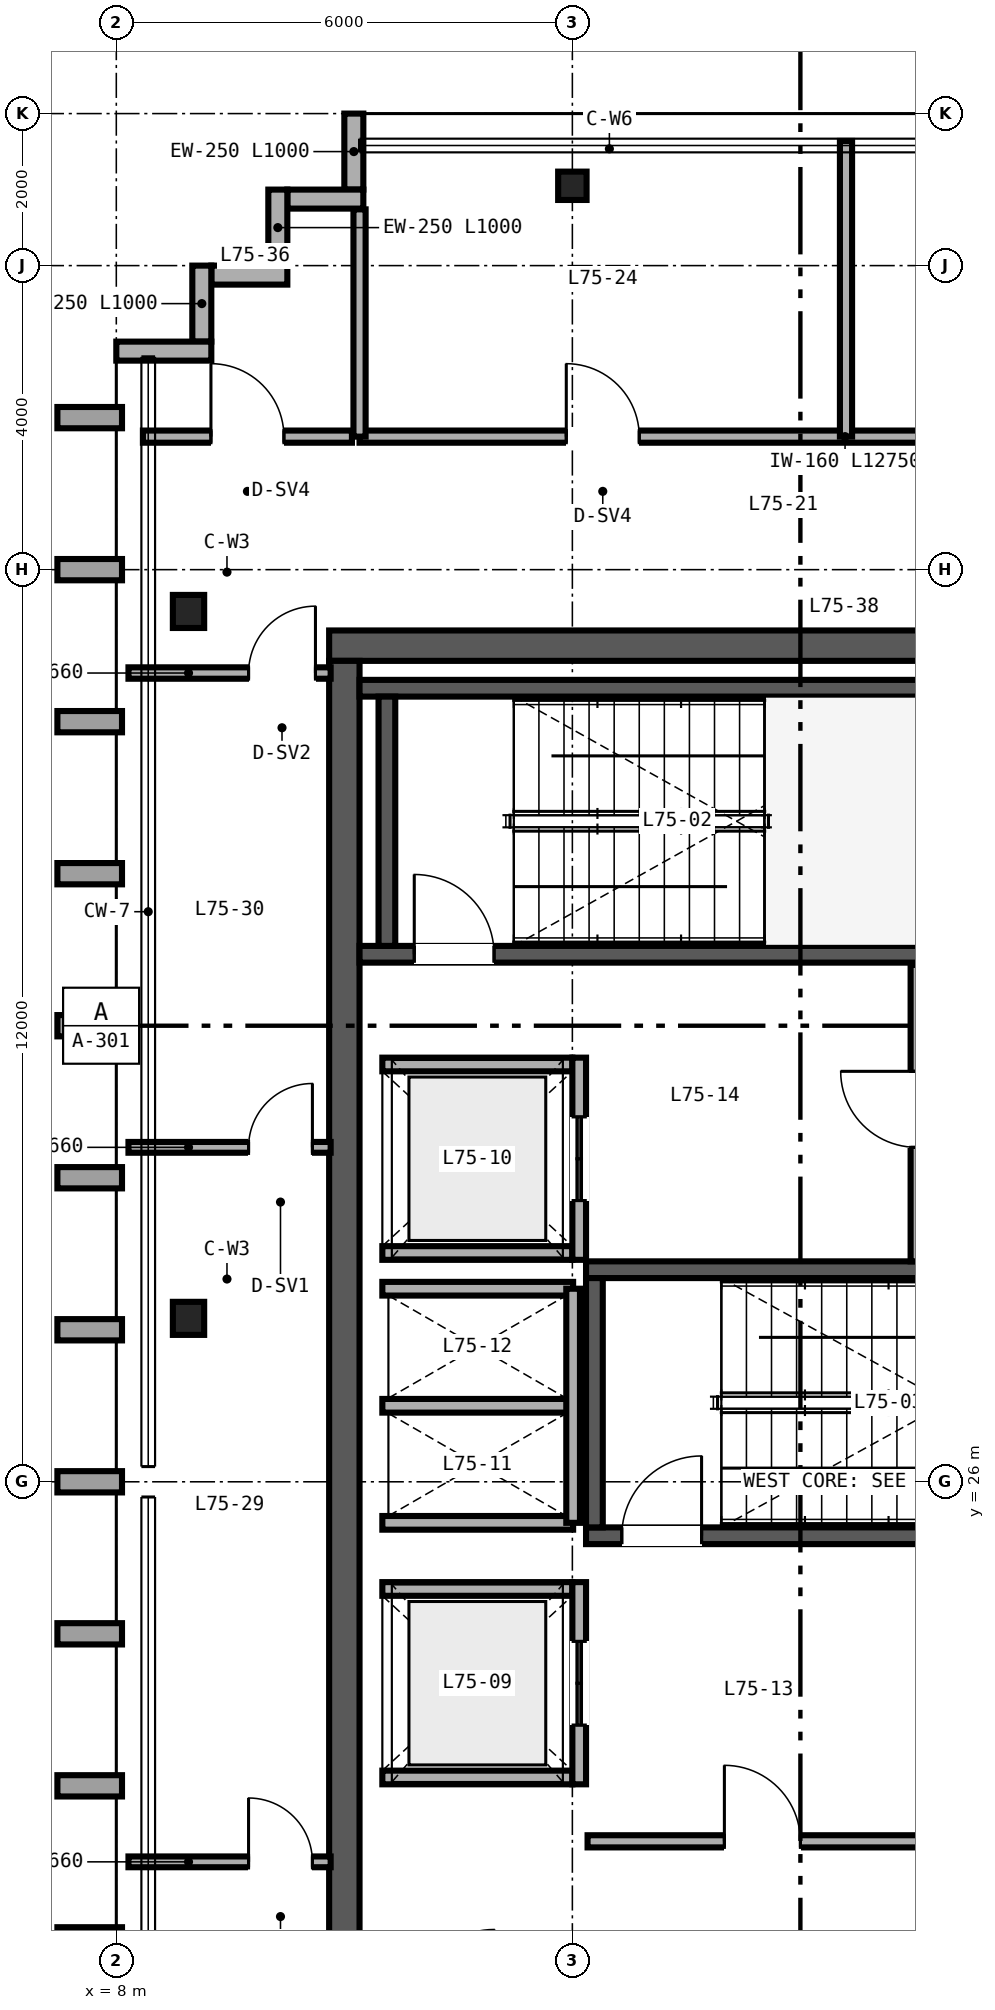
"""IFC4 building model, lengths in metres.
Left out: names, types, materials, properties, quantities, classifications, styles, units other than length and angle.
Written with IfcOpenShell. Run it as: python <this file> out.ifc"""

import sys

from ifc_helpers import new_model, si_unit, direction, frame, frame_2d, origin, origin_2d, place, context, subcontext, project, spatial, rectangle, i_section, extrude, source, transform, mapped, element, fill, save


model = new_model("IFC4")
c1 = context("Model", 3, precision=1e-05, world=origin(), true_north=direction((0.0, 1.0)))
c2 = subcontext(c1, "Body", "Model", "MODEL_VIEW")
j1 = project(units=[si_unit("LENGTHUNIT", "METRE"), si_unit("PLANEANGLEUNIT", "RADIAN")], contexts=[c1])
p1 = place(None, origin())
s1 = spatial("IfcSite", under=j1, at=p1, CompositionType="ELEMENT")
p2 = place(p1, origin())
s2 = spatial("IfcBuilding", under=s1, at=p2, CompositionType="ELEMENT")
p3 = place(p2, frame((0.0, 0.0, 294.0)))
s3 = spatial("IfcBuildingStorey", under=s2, at=p3, CompositionType="ELEMENT", Elevation=294.0)
p4 = place(p3, frame((10.8, 37.0, 0.0), z_axis=(0.0, 0.0, 1.0), x_axis=(1.0, 0.0, 0.0)))
e1 = element("IfcWall", 1, at=p4, inside=s3, PredefinedType="SHEAR", context=c2, shape_type="SweptSolid", body=[
    extrude(rectangle(XDim=12.4, YDim=0.4, at=frame_2d((6.2, 0.0))), origin(), (0.0, 0.0, 1.0), 3.38),
])
p5 = place(p4, frame((10.3, 0.0, 0.0)))
e2 = element("IfcOpeningElement", 2, at=p5, cuts=e1, PredefinedType="OPENING", context=c2, shape_type="SweptSolid", body=[
    extrude(rectangle(XDim=1.0, YDim=2.15, at=frame_2d((0.5, 1.075))), frame((0.0, 0.21, 0.0), z_axis=(0.0, -1.0, 0.0), x_axis=(1.0, 0.0, 0.0)), (0.0, 0.0, 1.0), 0.42),
])
p6 = place(p3, frame((11.0, 15.2, 0.0), z_axis=(0.0, 0.0, 1.0), x_axis=(0.0, 1.0, 0.0)))
e3 = element("IfcWall", 3, at=p6, inside=s3, PredefinedType="SHEAR", context=c2, shape_type="SweptSolid", body=[
    extrude(rectangle(XDim=21.6, YDim=0.4, at=frame_2d((10.8, 0.0))), origin(), (0.0, 0.0, 1.0), 3.38),
])
p7 = place(p3, frame((11.2, 32.94, 0.0), z_axis=(0.0, 0.0, 1.0), x_axis=(1.0, 0.0, 0.0)))
e4 = element("IfcWall", 4, at=p7, inside=s3, PredefinedType="SHEAR", context=c2, shape_type="SweptSolid", body=[
    extrude(rectangle(XDim=8.11, YDim=0.22, at=frame_2d((4.055, 0.0))), origin(), (0.0, 0.0, 1.0), 3.4),
])
p8 = place(p7, frame((0.72, 0.0, 0.0)))
e5 = element("IfcOpeningElement", 5, at=p8, cuts=e4, PredefinedType="OPENING", context=c2, shape_type="SweptSolid", body=[
    extrude(rectangle(XDim=1.05, YDim=2.15, at=frame_2d((0.525, 1.075))), frame((0.0, 0.12, 0.0), z_axis=(0.0, -1.0, 0.0), x_axis=(1.0, 0.0, 0.0)), (0.0, 0.0, 1.0), 0.24),
])
p9 = place(p3, frame((11.2, 36.44, 0.0), z_axis=(0.0, 0.0, 1.0), x_axis=(1.0, 0.0, 0.0)))
e6 = element("IfcWall", 6, at=p9, inside=s3, PredefinedType="SHEAR", context=c2, shape_type="SweptSolid", body=[
    extrude(rectangle(XDim=8.11, YDim=0.22, at=frame_2d((4.055, 0.0))), origin(), (0.0, 0.0, 1.0), 3.4),
])
p10 = place(p3, frame((11.56, 33.05, 0.0), z_axis=(0.0, 0.0, 1.0), x_axis=(0.0, 1.0, 0.0)))
e7 = element("IfcWall", 7, at=p10, inside=s3, PredefinedType="SHEAR", context=c2, shape_type="SweptSolid", body=[
    extrude(rectangle(XDim=3.28, YDim=0.22, at=frame_2d((1.64, 0.0))), origin(), (0.0, 0.0, 1.0), 3.4),
])
p11 = place(p3, frame((14.18, 25.29, 0.0), z_axis=(0.0, 0.0, 1.0), x_axis=(1.0, 0.0, 0.0)))
e8 = element("IfcWall", 8, at=p11, inside=s3, PredefinedType="SHEAR", context=c2, shape_type="SweptSolid", body=[
    extrude(rectangle(XDim=8.62, YDim=0.22, at=frame_2d((4.31, 0.0))), origin(), (0.0, 0.0, 1.0), 3.4),
])
p12 = place(p11, frame((0.47, 0.0, 0.0)))
e9 = element("IfcOpeningElement", 9, at=p12, cuts=e8, PredefinedType="OPENING", context=c2, shape_type="SweptSolid", body=[
    extrude(rectangle(XDim=1.05, YDim=2.15, at=frame_2d((0.525, 1.075))), frame((0.0, 0.12, 0.0), z_axis=(0.0, -1.0, 0.0), x_axis=(1.0, 0.0, 0.0)), (0.0, 0.0, 1.0), 0.24),
])
p13 = place(p3, frame((14.18, 28.79, 0.0), z_axis=(0.0, 0.0, 1.0), x_axis=(1.0, 0.0, 0.0)))
e10 = element("IfcWall", 10, at=p13, inside=s3, PredefinedType="SHEAR", context=c2, shape_type="SweptSolid", body=[
    extrude(rectangle(XDim=8.62, YDim=0.22, at=frame_2d((4.31, 0.0))), origin(), (0.0, 0.0, 1.0), 3.4),
])
p14 = place(p3, frame((14.29, 25.4, 0.0), z_axis=(0.0, 0.0, 1.0), x_axis=(0.0, 1.0, 0.0)))
e11 = element("IfcWall", 11, at=p14, inside=s3, PredefinedType="SHEAR", context=c2, shape_type="SweptSolid", body=[
    extrude(rectangle(XDim=3.28, YDim=0.22, at=frame_2d((1.64, 0.0))), origin(), (0.0, 0.0, 1.0), 3.4),
])
m1 = source(origin(), c2, "Body", "SweptSolid", [
    extrude(i_section(OverallWidth=0.412, OverallDepth=0.435, WebThickness=0.036, FlangeThickness=0.057, FilletRadius=0.025, at=origin_2d()), origin(), (0.0, 0.0, 1.0), 3.38),
])
for number, where, z_axis, x_axis in (
    (12, (8.95, 28.15, 0.0), (0.0, 0.0, 1.0), (1.0, 0.0, 0.0)),
    (13, (8.95, 37.45, 0.0), (0.0, 0.0, 1.0), (1.0, 0.0, 0.0)),
):
    element("IfcColumn", number, at=place(p3, frame(where, z_axis=z_axis, x_axis=x_axis)), inside=s3, PredefinedType="COLUMN", context=c2, shape_type="MappedRepresentation", body=[
        mapped(m1, transform((0.0, 0.0, 0.0), scale=1.0)),
    ])
m2 = source(origin(), c2, "Body", "SweptSolid", [
    extrude(i_section(OverallWidth=0.374, OverallDepth=0.373, WebThickness=0.016, FlangeThickness=0.026, FilletRadius=0.025, at=origin_2d()), origin(), (0.0, 0.0, 1.0), 3.38),
])
p15 = place(p3, frame((14.0, 43.05, 0.0), z_axis=(0.0, 0.0, 1.0), x_axis=(1.0, 0.0, 0.0)))
e14 = element("IfcColumn", 14, at=p15, inside=s3, PredefinedType="COLUMN", context=c2, shape_type="MappedRepresentation", body=[
    mapped(m2, transform((0.0, 0.0, 0.0), scale=1.0)),
])
for number, where, z_axis, x_axis in (
    (15, (11.125, 44.0, 0.0), (0.0, 0.0, 1.0), (0.0, -1.0, 0.0)),
    (16, (11.25, 42.875, 0.0), (0.0, 0.0, 1.0), (-1.0, 0.0, 0.0)),
    (17, (10.125, 43.0, 0.0), (0.0, 0.0, 1.0), (0.0, -1.0, 0.0)),
    (18, (10.25, 41.875, 0.0), (0.0, 0.0, 1.0), (-1.0, 0.0, 0.0)),
    (19, (9.125, 42.0, 0.0), (0.0, 0.0, 1.0), (0.0, -1.0, 0.0)),
):
    element("IfcWall", number, at=place(p3, frame(where, z_axis=z_axis, x_axis=x_axis)), inside=s3, PredefinedType="SOLIDWALL", context=c2, shape_type="SweptSolid", body=[
        extrude(rectangle(XDim=1.0, YDim=0.25, at=frame_2d((0.5, 0.0))), origin(), (0.0, 0.0, 1.0), 3.38),
    ])
p16 = place(p3, frame((9.25, 40.875, 0.0), z_axis=(0.0, 0.0, 1.0), x_axis=(-1.0, 0.0, 0.0)))
e20 = element("IfcWall", 20, at=p16, inside=s3, PredefinedType="SOLIDWALL", context=c2, shape_type="SweptSolid", body=[
    extrude(rectangle(XDim=1.25, YDim=0.25, at=frame_2d((0.625, 0.0))), origin(), (0.0, 0.0, 1.0), 3.38),
])
for number, where, z_axis, x_axis in (
    (21, (11.5, 22.11, 0.0), (0.0, 0.0, 1.0), (1.0, 0.0, 0.0)),
    (22, (11.5, 24.59, 0.0), (0.0, 0.0, 1.0), (1.0, 0.0, 0.0)),
):
    element("IfcWall", number, at=place(p3, frame(where, z_axis=z_axis, x_axis=x_axis)), inside=s3, PredefinedType="SOLIDWALL", context=c2, shape_type="SweptSolid", body=[
        extrude(rectangle(XDim=2.5, YDim=0.18, at=frame_2d((1.25, 0.0))), origin(), (0.0, 0.0, 1.0), 3.38),
    ])
p17 = place(p3, frame((14.09, 22.02, 0.0), z_axis=(0.0, 0.0, 1.0), x_axis=(0.0, 1.0, 0.0)))
e23 = element("IfcWall", 23, at=p17, inside=s3, PredefinedType="SOLIDWALL", context=c2, shape_type="SweptSolid", body=[
    extrude(rectangle(XDim=2.66, YDim=0.18, at=frame_2d((1.33, 0.0))), origin(), (0.0, 0.0, 1.0), 3.38),
])
p18 = place(p17, frame((0.78, 0.0, 0.0)))
e24 = element("IfcOpeningElement", 24, at=p18, cuts=e23, PredefinedType="OPENING", context=c2, shape_type="SweptSolid", body=[
    extrude(rectangle(XDim=1.1, YDim=2.2, at=frame_2d((0.55, 1.1))), frame((0.0, 0.1, 0.0), z_axis=(0.0, -1.0, 0.0), x_axis=(1.0, 0.0, 0.0)), (0.0, 0.0, 1.0), 0.2),
])
for number, where, z_axis, x_axis in (
    (25, (11.5, 29.01, 0.0), (0.0, 0.0, 1.0), (1.0, 0.0, 0.0)),
    (26, (11.5, 31.49, 0.0), (0.0, 0.0, 1.0), (1.0, 0.0, 0.0)),
):
    element("IfcWall", number, at=place(p3, frame(where, z_axis=z_axis, x_axis=x_axis)), inside=s3, PredefinedType="SOLIDWALL", context=c2, shape_type="SweptSolid", body=[
        extrude(rectangle(XDim=2.5, YDim=0.18, at=frame_2d((1.25, 0.0))), origin(), (0.0, 0.0, 1.0), 3.38),
    ])
p19 = place(p3, frame((14.09, 28.92, 0.0), z_axis=(0.0, 0.0, 1.0), x_axis=(0.0, 1.0, 0.0)))
e27 = element("IfcWall", 27, at=p19, inside=s3, PredefinedType="SOLIDWALL", context=c2, shape_type="SweptSolid", body=[
    extrude(rectangle(XDim=2.66, YDim=0.18, at=frame_2d((1.33, 0.0))), origin(), (0.0, 0.0, 1.0), 3.38),
])
p20 = place(p19, frame((0.78, 0.0, 0.0)))
e28 = element("IfcOpeningElement", 28, at=p20, cuts=e27, PredefinedType="OPENING", context=c2, shape_type="SweptSolid", body=[
    extrude(rectangle(XDim=1.1, YDim=2.2, at=frame_2d((0.55, 1.1))), frame((0.0, 0.1, 0.0), z_axis=(0.0, -1.0, 0.0), x_axis=(1.0, 0.0, 0.0)), (0.0, 0.0, 1.0), 0.2),
])
for number, where, z_axis, x_axis in (
    (29, (11.5, 25.46, 0.0), (0.0, 0.0, 1.0), (1.0, 0.0, 0.0)),
    (30, (11.5, 27.0, 0.0), (0.0, 0.0, 1.0), (1.0, 0.0, 0.0)),
    (31, (11.5, 28.54, 0.0), (0.0, 0.0, 1.0), (1.0, 0.0, 0.0)),
):
    element("IfcWall", number, at=place(p3, frame(where, z_axis=z_axis, x_axis=x_axis)), inside=s3, PredefinedType="SOLIDWALL", context=c2, shape_type="SweptSolid", body=[
        extrude(rectangle(XDim=2.51, YDim=0.18, at=frame_2d((1.255, 0.0))), origin(), (0.0, 0.0, 1.0), 3.38),
    ])
p21 = place(p3, frame((14.01, 25.46, 0.0), z_axis=(0.0, 0.0, 1.0), x_axis=(0.0, 1.0, 0.0)))
e32 = element("IfcWall", 32, at=p21, inside=s3, PredefinedType="SOLIDWALL", context=c2, shape_type="SweptSolid", body=[
    extrude(rectangle(XDim=3.08, YDim=0.18, at=frame_2d((1.54, 0.0))), origin(), (0.0, 0.0, 1.0), 3.38),
])
p22 = place(p3, frame((14.2, 21.27, 0.0), z_axis=(0.0, 0.0, 1.0), x_axis=(1.0, 0.0, 0.0)))
e33 = element("IfcWall", 33, at=p22, inside=s3, PredefinedType="PARTITIONING", context=c2, shape_type="SweptSolid", body=[
    extrude(rectangle(XDim=4.58, YDim=0.16, at=frame_2d((2.29, 0.0))), origin(), (0.0, 0.0, 1.0), 3.38),
])
p23 = place(p22, frame((1.8, 0.0, 0.0)))
e34 = element("IfcOpeningElement", 34, at=p23, cuts=e33, PredefinedType="OPENING", context=c2, shape_type="SweptSolid", body=[
    extrude(rectangle(XDim=1.0, YDim=2.15, at=frame_2d((0.5, 1.075))), frame((0.0, 0.09, 0.0), z_axis=(0.0, -1.0, 0.0), x_axis=(1.0, 0.0, 0.0)), (0.0, 0.0, 1.0), 0.18),
])
p24 = place(p3, frame((18.53, 28.9, 0.0), z_axis=(0.0, 0.0, 1.0), x_axis=(0.0, 1.0, 0.0)))
e35 = element("IfcWall", 35, at=p24, inside=s3, PredefinedType="PARTITIONING", context=c2, shape_type="SweptSolid", body=[
    extrude(rectangle(XDim=3.9, YDim=0.16, at=frame_2d((1.95, 0.0))), origin(), (0.0, 0.0, 1.0), 3.38),
])
p25 = place(p24, frame((1.5, 0.0, 0.0)))
e36 = element("IfcOpeningElement", 36, at=p25, cuts=e35, PredefinedType="OPENING", context=c2, shape_type="SweptSolid", body=[
    extrude(rectangle(XDim=1.0, YDim=2.15, at=frame_2d((0.5, 1.075))), frame((0.0, 0.09, 0.0), z_axis=(0.0, -1.0, 0.0), x_axis=(1.0, 0.0, 0.0)), (0.0, 0.0, 1.0), 0.18),
])
p26 = place(p3, frame((11.2, 39.75, 0.0), z_axis=(0.0, 0.0, 1.0), x_axis=(1.0, 0.0, 0.0)))
e37 = element("IfcWall", 37, at=p26, inside=s3, PredefinedType="PARTITIONING", context=c2, shape_type="SweptSolid", body=[
    extrude(rectangle(XDim=12.75, YDim=0.16, at=frame_2d((6.375, 0.0))), origin(), (0.0, 0.0, 1.0), 3.38),
])
p27 = place(p26, frame((2.72, 0.0, 0.0)))
e38 = element("IfcOpeningElement", 38, at=p27, cuts=e37, PredefinedType="OPENING", context=c2, shape_type="SweptSolid", body=[
    extrude(rectangle(XDim=0.96, YDim=2.15, at=frame_2d((0.48, 1.075))), frame((0.0, 0.09, 0.0), z_axis=(0.0, -1.0, 0.0), x_axis=(1.0, 0.0, 0.0)), (0.0, 0.0, 1.0), 0.18),
])
p28 = place(p26, frame((9.095, 0.0, 0.0)))
e39 = element("IfcOpeningElement", 39, at=p28, cuts=e37, PredefinedType="OPENING", context=c2, shape_type="SweptSolid", body=[
    extrude(rectangle(XDim=0.96, YDim=2.15, at=frame_2d((0.48, 1.075))), frame((0.0, 0.09, 0.0), z_axis=(0.0, -1.0, 0.0), x_axis=(1.0, 0.0, 0.0)), (0.0, 0.0, 1.0), 0.18),
])
p29 = place(p3, frame((11.2, 39.75, 0.0), z_axis=(0.0, 0.0, 1.0), x_axis=(0.0, 1.0, 0.0)))
e40 = element("IfcWall", 40, at=p29, inside=s3, PredefinedType="PARTITIONING", context=c2, shape_type="SweptSolid", body=[
    extrude(rectangle(XDim=2.99, YDim=0.16, at=frame_2d((1.495, 0.0))), origin(), (0.0, 0.0, 1.0), 3.38),
])
p30 = place(p3, frame((17.6, 39.75, 0.0), z_axis=(0.0, 0.0, 1.0), x_axis=(0.0, 1.0, 0.0)))
e41 = element("IfcWall", 41, at=p30, inside=s3, PredefinedType="PARTITIONING", context=c2, shape_type="SweptSolid", body=[
    extrude(rectangle(XDim=3.89, YDim=0.16, at=frame_2d((1.945, 0.0))), origin(), (0.0, 0.0, 1.0), 2.687),
])
p31 = place(p3, frame((8.16, 36.64, 0.0), z_axis=(0.0, 0.0, 1.0), x_axis=(1.0, 0.0, 0.0)))
e42 = element("IfcWall", 42, at=p31, inside=s3, PredefinedType="PARTITIONING", context=c2, shape_type="SweptSolid", body=[
    extrude(rectangle(XDim=2.66, YDim=0.15, at=frame_2d((1.33, 0.0))), origin(), (0.0, 0.0, 1.0), 2.763),
])
p32 = place(p31, frame((1.58, 0.0, 0.0)))
e43 = element("IfcOpeningElement", 43, at=p32, cuts=e42, PredefinedType="OPENING", context=c2, shape_type="SweptSolid", body=[
    extrude(rectangle(XDim=0.88, YDim=2.15, at=frame_2d((0.44, 1.075))), frame((0.0, 0.085, 0.0), z_axis=(0.0, -1.0, 0.0), x_axis=(1.0, 0.0, 0.0)), (0.0, 0.0, 1.0), 0.17),
])
p33 = place(p3, frame((8.16, 21.0, 0.0), z_axis=(0.0, 0.0, 1.0), x_axis=(1.0, 0.0, 0.0)))
e44 = element("IfcWall", 44, at=p33, inside=s3, PredefinedType="PARTITIONING", context=c2, shape_type="SweptSolid", body=[
    extrude(rectangle(XDim=2.66, YDim=0.142, at=frame_2d((1.33, 0.0))), origin(), (0.0, 0.0, 1.0), 2.48),
])
p34 = place(p33, frame((1.58, 0.0, 0.0)))
e45 = element("IfcOpeningElement", 45, at=p34, cuts=e44, PredefinedType="OPENING", context=c2, shape_type="SweptSolid", body=[
    extrude(rectangle(XDim=0.84, YDim=2.1, at=frame_2d((0.42, 1.05))), frame((0.0, 0.081, 0.0), z_axis=(0.0, -1.0, 0.0), x_axis=(1.0, 0.0, 0.0)), (0.0, 0.0, 1.0), 0.162),
])
p35 = place(p3, frame((8.16, 30.4, 0.0), z_axis=(0.0, 0.0, 1.0), x_axis=(1.0, 0.0, 0.0)))
e46 = element("IfcWall", 46, at=p35, inside=s3, PredefinedType="PARTITIONING", context=c2, shape_type="SweptSolid", body=[
    extrude(rectangle(XDim=2.66, YDim=0.142, at=frame_2d((1.33, 0.0))), origin(), (0.0, 0.0, 1.0), 2.763),
])
p36 = place(p35, frame((1.58, 0.0, 0.0)))
e47 = element("IfcOpeningElement", 47, at=p36, cuts=e46, PredefinedType="OPENING", context=c2, shape_type="SweptSolid", body=[
    extrude(rectangle(XDim=0.84, YDim=2.1, at=frame_2d((0.42, 1.05))), frame((0.0, 0.081, 0.0), z_axis=(0.0, -1.0, 0.0), x_axis=(1.0, 0.0, 0.0)), (0.0, 0.0, 1.0), 0.162),
])
p37 = place(p3, frame((8.35, 39.75, 0.0), z_axis=(0.0, 0.0, 1.0), x_axis=(1.0, 0.0, 0.0)))
e48 = element("IfcWall", 48, at=p37, inside=s3, PredefinedType="PARTITIONING", context=c2, shape_type="SweptSolid", body=[
    extrude(rectangle(XDim=2.75, YDim=0.16, at=frame_2d((1.375, 0.0))), origin(), (0.0, 0.0, 1.0), 3.38),
])
p38 = place(p37, frame((0.895, 0.0, 0.0)))
e49 = element("IfcOpeningElement", 49, at=p38, cuts=e48, PredefinedType="OPENING", context=c2, shape_type="SweptSolid", body=[
    extrude(rectangle(XDim=0.96, YDim=2.15, at=frame_2d((0.48, 1.075))), frame((0.0, 0.09, 0.0), z_axis=(0.0, -1.0, 0.0), x_axis=(1.0, 0.0, 0.0)), (0.0, 0.0, 1.0), 0.18),
])
m3 = source(origin(), c2, "Body", "SweptSolid", [
    extrude(rectangle(XDim=1.05, YDim=2.15, at=frame_2d((0.525, 1.075))), frame((0.0, 0.025, 0.0), z_axis=(0.0, -1.0, 0.0), x_axis=(1.0, 0.0, 0.0)), (0.0, 0.0, 1.0), 0.05),
])
p39 = place(p8, origin())
e50 = element("IfcDoor", 50, at=p39, inside=s3, OperationType="SINGLE_SWING_LEFT", PredefinedType="DOOR", context=c2, shape_type="MappedRepresentation", body=[
    mapped(m3, transform((0.0, 0.0, 0.0), scale=1.0)),
])
fill(e5, e50)
p40 = place(p12, origin())
e51 = element("IfcDoor", 51, at=p40, inside=s3, OperationType="SINGLE_SWING_RIGHT", PredefinedType="DOOR", context=c2, shape_type="MappedRepresentation", body=[
    mapped(m3, transform((0.0, 0.0, 0.0), scale=1.0)),
])
fill(e9, e51)
m4 = source(origin(), c2, "Body", "SweptSolid", [
    extrude(rectangle(XDim=1.1, YDim=2.2, at=frame_2d((0.55, 1.1))), frame((0.0, 0.025, 0.0), z_axis=(0.0, -1.0, 0.0), x_axis=(1.0, 0.0, 0.0)), (0.0, 0.0, 1.0), 0.05),
])
p41 = place(p18, origin())
e52 = element("IfcDoor", 52, at=p41, inside=s3, OperationType="DOUBLE_DOOR_SLIDING", PredefinedType="DOOR", context=c2, shape_type="MappedRepresentation", body=[
    mapped(m4, transform((0.0, 0.0, 0.0), scale=1.0)),
])
fill(e24, e52)
p42 = place(p20, origin())
e53 = element("IfcDoor", 53, at=p42, inside=s3, OperationType="DOUBLE_DOOR_SLIDING", PredefinedType="DOOR", context=c2, shape_type="MappedRepresentation", body=[
    mapped(m4, transform((0.0, 0.0, 0.0), scale=1.0)),
])
fill(e28, e53)
m5 = source(origin(), c2, "Body", "SweptSolid", [
    extrude(rectangle(XDim=1.0, YDim=2.15, at=frame_2d((0.5, 1.075))), frame((0.0, 0.025, 0.0), z_axis=(0.0, -1.0, 0.0), x_axis=(1.0, 0.0, 0.0)), (0.0, 0.0, 1.0), 0.05),
])
p43 = place(p23, origin())
e54 = element("IfcDoor", 54, at=p43, inside=s3, OperationType="SINGLE_SWING_LEFT", PredefinedType="DOOR", context=c2, shape_type="MappedRepresentation", body=[
    mapped(m5, transform((0.0, 0.0, 0.0), scale=1.0)),
])
fill(e34, e54)
p44 = place(p25, origin())
e55 = element("IfcDoor", 55, at=p44, inside=s3, OperationType="SINGLE_SWING_RIGHT", PredefinedType="DOOR", context=c2, shape_type="MappedRepresentation", body=[
    mapped(m5, transform((0.0, 0.0, 0.0), scale=1.0)),
])
fill(e36, e55)
m6 = source(origin(), c2, "Body", "SweptSolid", [
    extrude(rectangle(XDim=0.96, YDim=2.15, at=frame_2d((0.48, 1.075))), frame((0.0, 0.025, 0.0), z_axis=(0.0, -1.0, 0.0), x_axis=(1.0, 0.0, 0.0)), (0.0, 0.0, 1.0), 0.05),
])
p45 = place(p27, origin())
e56 = element("IfcDoor", 56, at=p45, inside=s3, OperationType="SINGLE_SWING_LEFT", PredefinedType="DOOR", context=c2, shape_type="MappedRepresentation", body=[
    mapped(m6, transform((0.0, 0.0, 0.0), scale=1.0)),
])
fill(e38, e56)
m7 = source(origin(), c2, "Body", "SweptSolid", [
    extrude(rectangle(XDim=0.88, YDim=2.15, at=frame_2d((0.44, 1.075))), frame((0.0, 0.025, 0.0), z_axis=(0.0, -1.0, 0.0), x_axis=(1.0, 0.0, 0.0)), (0.0, 0.0, 1.0), 0.05),
])
p46 = place(p32, origin())
e57 = element("IfcDoor", 57, at=p46, inside=s3, OperationType="SINGLE_SWING_RIGHT", PredefinedType="DOOR", context=c2, shape_type="MappedRepresentation", body=[
    mapped(m7, transform((0.0, 0.0, 0.0), scale=1.0)),
])
fill(e43, e57)
m8 = source(origin(), c2, "Body", "SweptSolid", [
    extrude(rectangle(XDim=0.84, YDim=2.1, at=frame_2d((0.42, 1.05))), frame((0.0, 0.025, 0.0), z_axis=(0.0, -1.0, 0.0), x_axis=(1.0, 0.0, 0.0)), (0.0, 0.0, 1.0), 0.05),
])
p47 = place(p34, origin())
e58 = element("IfcDoor", 58, at=p47, inside=s3, OperationType="SINGLE_SWING_LEFT", PredefinedType="DOOR", context=c2, shape_type="MappedRepresentation", body=[
    mapped(m8, transform((0.0, 0.0, 0.0), scale=1.0)),
])
fill(e45, e58)
p48 = place(p36, origin())
e59 = element("IfcDoor", 59, at=p48, inside=s3, OperationType="SINGLE_SWING_RIGHT", PredefinedType="DOOR", context=c2, shape_type="MappedRepresentation", body=[
    mapped(m8, transform((0.0, 0.0, 0.0), scale=1.0)),
])
fill(e47, e59)
p49 = place(p38, origin())
e60 = element("IfcDoor", 60, at=p49, inside=s3, OperationType="SINGLE_SWING_LEFT", PredefinedType="DOOR", context=c2, shape_type="MappedRepresentation", body=[
    mapped(m6, transform((0.0, 0.0, 0.0), scale=1.0)),
])
fill(e49, e60)
save(model, sys.argv[1])
